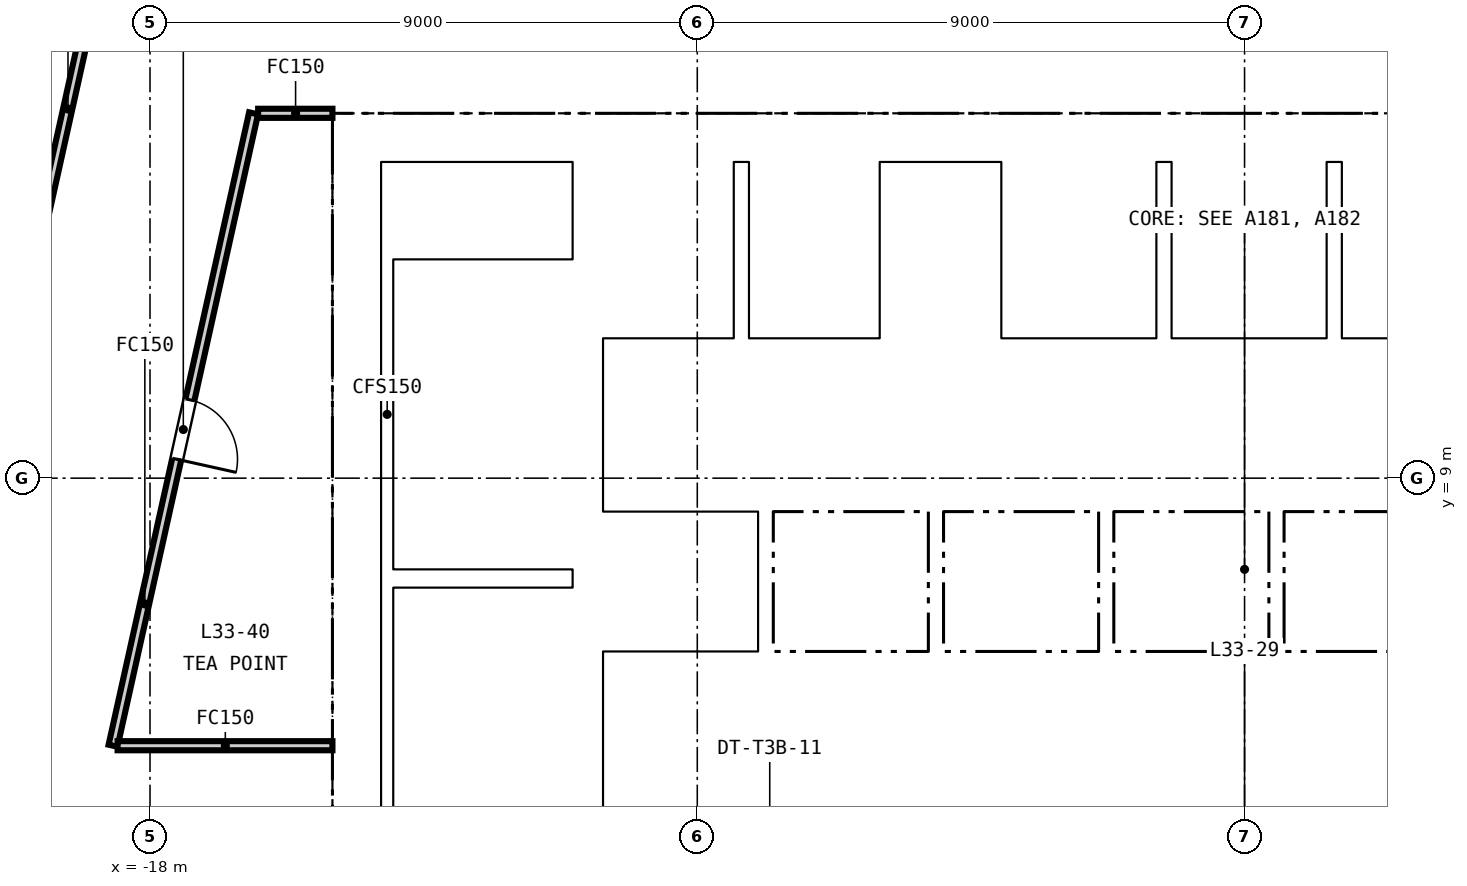
"""IFC4 building model, lengths in metres.
Left out: names, types, materials, properties, quantities, classifications, styles, units other than length and angle.
Written with IfcOpenShell. Run it as: python <this file> out.ifc"""

import sys

from ifc_helpers import new_model, si_unit, direction, frame, frame_2d, origin, place, context, subcontext, project, spatial, rectangle, extrude, element, fill, save


model = new_model("IFC4")
c1 = context("Model", 3, precision=1e-05, world=origin(), true_north=direction((0.0, 1.0)))
c2 = subcontext(c1, "Body", "Model", "MODEL_VIEW")
j1 = project(units=[si_unit("LENGTHUNIT", "METRE"), si_unit("PLANEANGLEUNIT", "RADIAN")], contexts=[c1])
p1 = place(None, origin())
s1 = spatial("IfcSite", under=j1, at=p1, CompositionType="ELEMENT")
p2 = place(p1, origin())
s2 = spatial("IfcBuilding", under=s1, at=p2, CompositionType="ELEMENT")
p3 = place(p2, frame((0.0, 0.0, 137.1)))
s3 = spatial("IfcBuildingStorey", under=s2, at=p3, CompositionType="ELEMENT", Elevation=137.1)
p4 = place(p3, frame((-15.0, 14.6, -0.15), z_axis=(0.0, 0.0, 1.0), x_axis=(1.0, 0.0, 0.0)))
e1 = element("IfcWall", 1, at=p4, inside=s3, PredefinedType="SOLIDWALL", context=c2, shape_type="SweptSolid", body=[
    extrude(rectangle(XDim=30.0, YDim=0.8, at=frame_2d((15.0, 0.0))), origin(), (0.0, 0.0, 1.0), 3.65),
])
p5 = place(p4, frame((9.25, 0.0, 0.15)))
e2 = element("IfcOpeningElement", 2, at=p5, cuts=e1, PredefinedType="OPENING", context=c2, shape_type="SweptSolid", body=[
    extrude(rectangle(XDim=1.5, YDim=2.1, at=frame_2d((0.75, 1.05))), frame((0.0, 0.41, 0.0), z_axis=(0.0, -1.0, 0.0), x_axis=(1.0, 0.0, 0.0)), (0.0, 0.0, 1.0), 0.82),
])
p6 = place(p4, frame((19.4, 0.0, 0.15)))
e3 = element("IfcOpeningElement", 3, at=p6, cuts=e1, PredefinedType="OPENING", context=c2, shape_type="SweptSolid", body=[
    extrude(rectangle(XDim=1.5, YDim=2.1, at=frame_2d((0.75, 1.05))), frame((0.0, 0.41, 0.0), z_axis=(0.0, -1.0, 0.0), x_axis=(1.0, 0.0, 0.0)), (0.0, 0.0, 1.0), 0.82),
])
p7 = place(p4, frame((1.5, 0.0, 0.15)))
e4 = element("IfcOpeningElement", 4, at=p7, cuts=e1, PredefinedType="OPENING", context=c2, shape_type="SweptSolid", body=[
    extrude(rectangle(XDim=1.2, YDim=2.1, at=frame_2d((0.6, 1.05))), frame((0.0, 0.41, 0.0), z_axis=(0.0, -1.0, 0.0), x_axis=(1.0, 0.0, 0.0)), (0.0, 0.0, 1.0), 0.82),
])
p8 = place(p4, frame((27.3, 0.0, 0.15)))
e5 = element("IfcOpeningElement", 5, at=p8, cuts=e1, PredefinedType="OPENING", context=c2, shape_type="SweptSolid", body=[
    extrude(rectangle(XDim=1.2, YDim=2.1, at=frame_2d((0.6, 1.05))), frame((0.0, 0.41, 0.0), z_axis=(0.0, -1.0, 0.0), x_axis=(1.0, 0.0, 0.0)), (0.0, 0.0, 1.0), 0.82),
])
p9 = place(p3, frame((-14.6, 0.8, -0.15), z_axis=(0.0, 0.0, 1.0), x_axis=(0.0, 1.0, 0.0)))
e6 = element("IfcWall", 6, at=p9, inside=s3, PredefinedType="SOLIDWALL", context=c2, shape_type="SweptSolid", body=[
    extrude(rectangle(XDim=13.4, YDim=0.8, at=frame_2d((6.7, 0.0))), origin(), (0.0, 0.0, 1.0), 3.65),
])
p10 = place(p3, frame((-10.8, 0.8, -0.15), z_axis=(0.0, 0.0, 1.0), x_axis=(0.0, 1.0, 0.0)))
e7 = element("IfcWall", 7, at=p10, inside=s3, PredefinedType="SOLIDWALL", context=c2, shape_type="SweptSolid", body=[
    extrude(rectangle(XDim=13.4, YDim=0.5, at=frame_2d((6.7, 0.0))), origin(), (0.0, 0.0, 1.0), 3.65),
])
p11 = place(p3, frame((-10.55, 6.025, 0.0), z_axis=(0.0, 0.0, 1.0), x_axis=(1.0, 0.0, 0.0)))
e8 = element("IfcWall", 8, at=p11, inside=s3, PredefinedType="PARTITIONING", context=c2, shape_type="SweptSolid", body=[
    extrude(rectangle(XDim=21.1, YDim=0.25, at=frame_2d((10.55, 0.0))), origin(), (0.0, 0.0, 1.0), 3.5),
])
p12 = place(p3, frame((-10.55, 8.55, 0.0), z_axis=(0.0, 0.0, 1.0), x_axis=(1.0, 0.0, 0.0)))
e9 = element("IfcWall", 9, at=p12, inside=s3, PredefinedType="PARTITIONING", context=c2, shape_type="SweptSolid", body=[
    extrude(rectangle(XDim=21.1, YDim=0.2, at=frame_2d((10.55, 0.0))), origin(), (0.0, 0.0, 1.0), 3.5),
])
p13 = place(p12, frame((0.675, 0.0, 0.0)))
e10 = element("IfcOpeningElement", 10, at=p13, cuts=e9, PredefinedType="OPENING", context=c2, shape_type="SweptSolid", body=[
    extrude(rectangle(XDim=1.2, YDim=2.1, at=frame_2d((0.6, 1.05))), frame((0.0, 0.11, 0.0), z_axis=(0.0, -1.0, 0.0), x_axis=(1.0, 0.0, 0.0)), (0.0, 0.0, 1.0), 0.22),
])
p14 = place(p12, frame((3.475, 0.0, 0.0)))
e11 = element("IfcOpeningElement", 11, at=p14, cuts=e9, PredefinedType="OPENING", context=c2, shape_type="SweptSolid", body=[
    extrude(rectangle(XDim=1.2, YDim=2.1, at=frame_2d((0.6, 1.05))), frame((0.0, 0.11, 0.0), z_axis=(0.0, -1.0, 0.0), x_axis=(1.0, 0.0, 0.0)), (0.0, 0.0, 1.0), 0.22),
])
p15 = place(p12, frame((6.275, 0.0, 0.0)))
e12 = element("IfcOpeningElement", 12, at=p15, cuts=e9, PredefinedType="OPENING", context=c2, shape_type="SweptSolid", body=[
    extrude(rectangle(XDim=1.2, YDim=2.1, at=frame_2d((0.6, 1.05))), frame((0.0, 0.11, 0.0), z_axis=(0.0, -1.0, 0.0), x_axis=(1.0, 0.0, 0.0)), (0.0, 0.0, 1.0), 0.22),
])
p16 = place(p12, frame((9.075, 0.0, 0.0)))
e13 = element("IfcOpeningElement", 13, at=p16, cuts=e9, PredefinedType="OPENING", context=c2, shape_type="SweptSolid", body=[
    extrude(rectangle(XDim=1.2, YDim=2.1, at=frame_2d((0.6, 1.05))), frame((0.0, 0.11, 0.0), z_axis=(0.0, -1.0, 0.0), x_axis=(1.0, 0.0, 0.0)), (0.0, 0.0, 1.0), 0.22),
])
p17 = place(p12, frame((11.875, 0.0, 0.0)))
e14 = element("IfcOpeningElement", 14, at=p17, cuts=e9, PredefinedType="OPENING", context=c2, shape_type="SweptSolid", body=[
    extrude(rectangle(XDim=1.2, YDim=2.1, at=frame_2d((0.6, 1.05))), frame((0.0, 0.11, 0.0), z_axis=(0.0, -1.0, 0.0), x_axis=(1.0, 0.0, 0.0)), (0.0, 0.0, 1.0), 0.22),
])
p18 = place(p12, frame((14.675, 0.0, 0.0)))
e15 = element("IfcOpeningElement", 15, at=p18, cuts=e9, PredefinedType="OPENING", context=c2, shape_type="SweptSolid", body=[
    extrude(rectangle(XDim=1.2, YDim=2.1, at=frame_2d((0.6, 1.05))), frame((0.0, 0.11, 0.0), z_axis=(0.0, -1.0, 0.0), x_axis=(1.0, 0.0, 0.0)), (0.0, 0.0, 1.0), 0.22),
])
p19 = place(p12, frame((17.475, 0.0, 0.0)))
e16 = element("IfcOpeningElement", 16, at=p19, cuts=e9, PredefinedType="OPENING", context=c2, shape_type="SweptSolid", body=[
    extrude(rectangle(XDim=1.2, YDim=2.1, at=frame_2d((0.6, 1.05))), frame((0.0, 0.11, 0.0), z_axis=(0.0, -1.0, 0.0), x_axis=(1.0, 0.0, 0.0)), (0.0, 0.0, 1.0), 0.22),
])
p20 = place(p12, frame((19.9, 0.0, 0.0)))
e17 = element("IfcOpeningElement", 17, at=p20, cuts=e9, PredefinedType="OPENING", context=c2, shape_type="SweptSolid", body=[
    extrude(rectangle(XDim=0.9, YDim=2.1, at=frame_2d((0.45, 1.05))), frame((0.0, 0.11, 0.0), z_axis=(0.0, -1.0, 0.0), x_axis=(1.0, 0.0, 0.0)), (0.0, 0.0, 1.0), 0.22),
])
p21 = place(p3, frame((-10.55, 11.2, 0.0), z_axis=(0.0, 0.0, 1.0), x_axis=(1.0, 0.0, 0.0)))
e18 = element("IfcWall", 18, at=p21, inside=s3, PredefinedType="PARTITIONING", context=c2, shape_type="SweptSolid", body=[
    extrude(rectangle(XDim=4.8, YDim=0.2, at=frame_2d((2.4, 0.0))), origin(), (0.0, 0.0, 1.0), 3.5),
])
p22 = place(p21, frame((0.525, 0.0, 0.0)))
e19 = element("IfcOpeningElement", 19, at=p22, cuts=e18, PredefinedType="OPENING", context=c2, shape_type="SweptSolid", body=[
    extrude(rectangle(XDim=1.1, YDim=2.1, at=frame_2d((0.55, 1.05))), frame((0.0, 0.11, 0.0), z_axis=(0.0, -1.0, 0.0), x_axis=(1.0, 0.0, 0.0)), (0.0, 0.0, 1.0), 0.22),
])
p23 = place(p21, frame((2.925, 0.0, 0.0)))
e20 = element("IfcOpeningElement", 20, at=p23, cuts=e18, PredefinedType="OPENING", context=c2, shape_type="SweptSolid", body=[
    extrude(rectangle(XDim=1.1, YDim=2.1, at=frame_2d((0.55, 1.05))), frame((0.0, 0.11, 0.0), z_axis=(0.0, -1.0, 0.0), x_axis=(1.0, 0.0, 0.0)), (0.0, 0.0, 1.0), 0.22),
])
p24 = place(p3, frame((-4.25, 11.2, 0.0), z_axis=(0.0, 0.0, 1.0), x_axis=(1.0, 0.0, 0.0)))
e21 = element("IfcWall", 21, at=p24, inside=s3, PredefinedType="PARTITIONING", context=c2, shape_type="SweptSolid", body=[
    extrude(rectangle(XDim=8.65, YDim=0.2, at=frame_2d((4.325, 0.0))), origin(), (0.0, 0.0, 1.0), 3.5),
])
p25 = place(p24, frame((0.825, 0.0, 0.0)))
e22 = element("IfcOpeningElement", 22, at=p25, cuts=e21, PredefinedType="OPENING", context=c2, shape_type="SweptSolid", body=[
    extrude(rectangle(XDim=1.4, YDim=2.1, at=frame_2d((0.7, 1.05))), frame((0.0, 0.11, 0.0), z_axis=(0.0, -1.0, 0.0), x_axis=(1.0, 0.0, 0.0)), (0.0, 0.0, 1.0), 0.22),
])
p26 = place(p24, frame((3.625, 0.0, 0.0)))
e23 = element("IfcOpeningElement", 23, at=p26, cuts=e21, PredefinedType="OPENING", context=c2, shape_type="SweptSolid", body=[
    extrude(rectangle(XDim=1.4, YDim=2.1, at=frame_2d((0.7, 1.05))), frame((0.0, 0.11, 0.0), z_axis=(0.0, -1.0, 0.0), x_axis=(1.0, 0.0, 0.0)), (0.0, 0.0, 1.0), 0.22),
])
p27 = place(p3, frame((-4.125, 8.65, 0.0), z_axis=(0.0, 0.0, 1.0), x_axis=(0.0, 1.0, 0.0)))
e24 = element("IfcWall", 24, at=p27, inside=s3, PredefinedType="PARTITIONING", context=c2, shape_type="SweptSolid", body=[
    extrude(rectangle(XDim=2.45, YDim=0.25, at=frame_2d((1.225, 0.0))), origin(), (0.0, 0.0, 1.0), 3.5),
])
p28 = place(p27, frame((0.625, 0.0, 0.0)))
e25 = element("IfcOpeningElement", 25, at=p28, cuts=e24, PredefinedType="OPENING", context=c2, shape_type="SweptSolid", body=[
    extrude(rectangle(XDim=1.2, YDim=2.1, at=frame_2d((0.6, 1.05))), frame((0.0, 0.135, 0.0), z_axis=(0.0, -1.0, 0.0), x_axis=(1.0, 0.0, 0.0)), (0.0, 0.0, 1.0), 0.27),
])
for number, where, z_axis, x_axis in (
    (26, (-8.15, 3.6, 0.0), (0.0, 0.0, 1.0), (0.0, 1.0, 0.0)),
    (27, (-3.35, 3.6, 0.0), (0.0, 0.0, 1.0), (0.0, 1.0, 0.0)),
    (28, (1.45, 3.6, 0.0), (0.0, 0.0, 1.0), (0.0, 1.0, 0.0)),
):
    element("IfcWall", number, at=place(p3, frame(where, z_axis=z_axis, x_axis=x_axis)), inside=s3, PredefinedType="PARTITIONING", context=c2, shape_type="SweptSolid", body=[
        extrude(rectangle(XDim=2.3, YDim=0.15, at=frame_2d((1.15, 0.0))), origin(), (0.0, 0.0, 1.0), 3.5),
    ])
for number, where, z_axis, x_axis in (
    (29, (-7.875, 6.15, 0.0), (0.0, 0.0, 1.0), (0.0, 1.0, 0.0)),
    (30, (-5.075, 6.15, 0.0), (0.0, 0.0, 1.0), (0.0, 1.0, 0.0)),
    (31, (-2.275, 6.15, 0.0), (0.0, 0.0, 1.0), (0.0, 1.0, 0.0)),
    (32, (0.525, 6.15, 0.0), (0.0, 0.0, 1.0), (0.0, 1.0, 0.0)),
):
    element("IfcWall", number, at=place(p3, frame(where, z_axis=z_axis, x_axis=x_axis)), inside=s3, PredefinedType="PARTITIONING", context=c2, shape_type="SweptSolid", body=[
        extrude(rectangle(XDim=2.3, YDim=0.25, at=frame_2d((1.15, 0.0))), origin(), (0.0, 0.0, 1.0), 3.5),
    ])
for number, where, z_axis, x_axis in (
    (33, (-8.275, 11.3, 0.0), (0.0, 0.0, 1.0), (0.0, 1.0, 0.0)),
    (34, (-5.875, 11.3, 0.0), (0.0, 0.0, 1.0), (0.0, 1.0, 0.0)),
    (35, (-4.125, 11.3, 0.0), (0.0, 0.0, 1.0), (0.0, 1.0, 0.0)),
    (36, (-1.325, 11.3, 0.0), (0.0, 0.0, 1.0), (0.0, 1.0, 0.0)),
    (37, (1.475, 11.3, 0.0), (0.0, 0.0, 1.0), (0.0, 1.0, 0.0)),
):
    element("IfcWall", number, at=place(p3, frame(where, z_axis=z_axis, x_axis=x_axis)), inside=s3, PredefinedType="PARTITIONING", context=c2, shape_type="SweptSolid", body=[
        extrude(rectangle(XDim=2.9, YDim=0.25, at=frame_2d((1.45, 0.0))), origin(), (0.0, 0.0, 1.0), 3.5),
    ])
p29 = place(p3, frame((-14.0, 7.35, 0.0), z_axis=(0.0, 0.0, 1.0), x_axis=(1.0, 0.0, 0.0)))
e38 = element("IfcWall", 38, at=p29, inside=s3, PredefinedType="SOLIDWALL", context=c2, shape_type="SweptSolid", body=[
    extrude(rectangle(XDim=2.95, YDim=0.3, at=frame_2d((1.475, 0.0))), origin(), (0.0, 0.0, 1.0), 3.5),
])
p30 = place(p3, frame((-14.1, 0.8, 0.0), z_axis=(0.0, 0.0, 1.0), x_axis=(0.0, 1.0, 0.0)))
e39 = element("IfcWall", 39, at=p30, inside=s3, PredefinedType="SOLIDWALL", context=c2, shape_type="SweptSolid", body=[
    extrude(rectangle(XDim=13.4, YDim=0.2, at=frame_2d((6.7, 0.0))), origin(), (0.0, 0.0, 1.0), 3.5),
])
p31 = place(p3, frame((-16.297, 15.0, 0.0), z_axis=(0.0, 0.0, 1.0), x_axis=(-0.216903766867, -0.976192991124, 0.0)))
e40 = element("IfcWall", 40, at=p31, inside=s3, PredefinedType="PARTITIONING", context=c2, shape_type="SweptSolid", body=[
    extrude(rectangle(XDim=10.654, YDim=0.15, at=frame_2d((5.327, 0.0))), origin(), (0.0, 0.0, 1.0), 2.741),
])
p32 = place(p31, frame((4.827, 0.0, 0.0)))
e41 = element("IfcOpeningElement", 41, at=p32, cuts=e40, PredefinedType="OPENING", context=c2, shape_type="SweptSolid", body=[
    extrude(rectangle(XDim=1.0, YDim=2.1, at=frame_2d((0.5, 1.05))), frame((0.0, 0.085, 0.0), z_axis=(0.0, -1.0, 0.0), x_axis=(1.0, 0.0, 0.0)), (0.0, 0.0, 1.0), 0.17),
])
p33 = place(p3, frame((-15.0, 15.0, 0.0), z_axis=(0.0, 0.0, 1.0), x_axis=(-1.0, 0.0, 0.0)))
e42 = element("IfcWall", 42, at=p33, inside=s3, PredefinedType="PARTITIONING", context=c2, shape_type="SweptSolid", body=[
    extrude(rectangle(XDim=1.222, YDim=0.15, at=frame_2d((0.611, 0.0))), origin(), (0.0, 0.0, 1.0), 2.741),
])
p34 = place(p3, frame((-20.005, 12.141, 0.0), z_axis=(0.0, 0.0, 1.0), x_axis=(0.216934764879, 0.976186103049, 0.0)))
e43 = element("IfcWall", 43, at=p34, inside=s3, PredefinedType="PARTITIONING", context=c2, shape_type="SweptSolid", body=[
    extrude(rectangle(XDim=6.002, YDim=0.15, at=frame_2d((3.001, 0.0))), origin(), (0.0, 0.0, 1.0), 2.741),
])
p35 = place(p3, frame((-18.533, 4.6, 0.0), z_axis=(0.0, 0.0, 1.0), x_axis=(1.0, 0.0, 0.0)))
e44 = element("IfcWall", 44, at=p35, inside=s3, PredefinedType="PARTITIONING", context=c2, shape_type="SweptSolid", body=[
    extrude(rectangle(XDim=3.533, YDim=0.15, at=frame_2d((1.767, 0.0))), origin(), (0.0, 0.0, 1.0), 2.741),
])
p36 = place(p28, origin())
e45 = element("IfcDoor", 45, at=p36, inside=s3, OperationType="SINGLE_SWING_LEFT", PredefinedType="DOOR", context=c2, shape_type="SweptSolid", body=[
    extrude(rectangle(XDim=1.2, YDim=2.1, at=frame_2d((0.6, 1.05))), frame((0.0, 0.025, 0.0), z_axis=(0.0, -1.0, 0.0), x_axis=(1.0, 0.0, 0.0)), (0.0, 0.0, 1.0), 0.05),
])
fill(e25, e45)
p37 = place(p13, origin())
e46 = element("IfcDoor", 46, at=p37, inside=s3, OperationType="DOUBLE_DOOR_SLIDING", PredefinedType="DOOR", context=c2, shape_type="SweptSolid", body=[
    extrude(rectangle(XDim=1.2, YDim=2.1, at=frame_2d((0.6, 1.05))), frame((0.0, 0.025, 0.0), z_axis=(0.0, -1.0, 0.0), x_axis=(1.0, 0.0, 0.0)), (0.0, 0.0, 1.0), 0.05),
])
fill(e10, e46)
p38 = place(p14, origin())
e47 = element("IfcDoor", 47, at=p38, inside=s3, OperationType="DOUBLE_DOOR_SLIDING", PredefinedType="DOOR", context=c2, shape_type="SweptSolid", body=[
    extrude(rectangle(XDim=1.2, YDim=2.1, at=frame_2d((0.6, 1.05))), frame((0.0, 0.025, 0.0), z_axis=(0.0, -1.0, 0.0), x_axis=(1.0, 0.0, 0.0)), (0.0, 0.0, 1.0), 0.05),
])
fill(e11, e47)
p39 = place(p15, origin())
e48 = element("IfcDoor", 48, at=p39, inside=s3, OperationType="DOUBLE_DOOR_SLIDING", PredefinedType="DOOR", context=c2, shape_type="SweptSolid", body=[
    extrude(rectangle(XDim=1.2, YDim=2.1, at=frame_2d((0.6, 1.05))), frame((0.0, 0.025, 0.0), z_axis=(0.0, -1.0, 0.0), x_axis=(1.0, 0.0, 0.0)), (0.0, 0.0, 1.0), 0.05),
])
fill(e12, e48)
p40 = place(p16, origin())
e49 = element("IfcDoor", 49, at=p40, inside=s3, OperationType="DOUBLE_DOOR_SLIDING", PredefinedType="DOOR", context=c2, shape_type="SweptSolid", body=[
    extrude(rectangle(XDim=1.2, YDim=2.1, at=frame_2d((0.6, 1.05))), frame((0.0, 0.025, 0.0), z_axis=(0.0, -1.0, 0.0), x_axis=(1.0, 0.0, 0.0)), (0.0, 0.0, 1.0), 0.05),
])
fill(e13, e49)
p41 = place(p17, origin())
e50 = element("IfcDoor", 50, at=p41, inside=s3, OperationType="DOUBLE_DOOR_SLIDING", PredefinedType="DOOR", context=c2, shape_type="SweptSolid", body=[
    extrude(rectangle(XDim=1.2, YDim=2.1, at=frame_2d((0.6, 1.05))), frame((0.0, 0.025, 0.0), z_axis=(0.0, -1.0, 0.0), x_axis=(1.0, 0.0, 0.0)), (0.0, 0.0, 1.0), 0.05),
])
fill(e14, e50)
p42 = place(p22, origin())
e51 = element("IfcDoor", 51, at=p42, inside=s3, OperationType="DOUBLE_DOOR_SLIDING", PredefinedType="DOOR", context=c2, shape_type="SweptSolid", body=[
    extrude(rectangle(XDim=1.1, YDim=2.1, at=frame_2d((0.55, 1.05))), frame((0.0, 0.025, 0.0), z_axis=(0.0, -1.0, 0.0), x_axis=(1.0, 0.0, 0.0)), (0.0, 0.0, 1.0), 0.05),
])
fill(e19, e51)
p43 = place(p23, origin())
e52 = element("IfcDoor", 52, at=p43, inside=s3, OperationType="DOUBLE_DOOR_SLIDING", PredefinedType="DOOR", context=c2, shape_type="SweptSolid", body=[
    extrude(rectangle(XDim=1.1, YDim=2.1, at=frame_2d((0.55, 1.05))), frame((0.0, 0.025, 0.0), z_axis=(0.0, -1.0, 0.0), x_axis=(1.0, 0.0, 0.0)), (0.0, 0.0, 1.0), 0.05),
])
fill(e20, e52)
p44 = place(p25, origin())
e53 = element("IfcDoor", 53, at=p44, inside=s3, OperationType="DOUBLE_DOOR_SLIDING", PredefinedType="DOOR", context=c2, shape_type="SweptSolid", body=[
    extrude(rectangle(XDim=1.4, YDim=2.1, at=frame_2d((0.7, 1.05))), frame((0.0, 0.025, 0.0), z_axis=(0.0, -1.0, 0.0), x_axis=(1.0, 0.0, 0.0)), (0.0, 0.0, 1.0), 0.05),
])
fill(e22, e53)
p45 = place(p26, origin())
e54 = element("IfcDoor", 54, at=p45, inside=s3, OperationType="DOUBLE_DOOR_SLIDING", PredefinedType="DOOR", context=c2, shape_type="SweptSolid", body=[
    extrude(rectangle(XDim=1.4, YDim=2.1, at=frame_2d((0.7, 1.05))), frame((0.0, 0.025, 0.0), z_axis=(0.0, -1.0, 0.0), x_axis=(1.0, 0.0, 0.0)), (0.0, 0.0, 1.0), 0.05),
])
fill(e23, e54)
p46 = place(p5, origin())
e55 = element("IfcDoor", 55, at=p46, inside=s3, OperationType="DOUBLE_DOOR_SINGLE_SWING", PredefinedType="DOOR", context=c2, shape_type="SweptSolid", body=[
    extrude(rectangle(XDim=1.5, YDim=2.1, at=frame_2d((0.75, 1.05))), frame((0.0, 0.025, 0.0), z_axis=(0.0, -1.0, 0.0), x_axis=(1.0, 0.0, 0.0)), (0.0, 0.0, 1.0), 0.05),
])
fill(e2, e55)
p47 = place(p7, origin())
e56 = element("IfcDoor", 56, at=p47, inside=s3, OperationType="SINGLE_SWING_RIGHT", PredefinedType="DOOR", context=c2, shape_type="SweptSolid", body=[
    extrude(rectangle(XDim=1.2, YDim=2.1, at=frame_2d((0.6, 1.05))), frame((0.0, 0.025, 0.0), z_axis=(0.0, -1.0, 0.0), x_axis=(1.0, 0.0, 0.0)), (0.0, 0.0, 1.0), 0.05),
])
fill(e4, e56)
p48 = place(p32, origin())
e57 = element("IfcDoor", 57, at=p48, inside=s3, OperationType="SINGLE_SWING_RIGHT", PredefinedType="DOOR", context=c2, shape_type="SweptSolid", body=[
    extrude(rectangle(XDim=1.0, YDim=2.1, at=frame_2d((0.5, 1.05))), frame((0.0, 0.025, 0.0), z_axis=(0.0, -1.0, 0.0), x_axis=(1.0, 0.0, 0.0)), (0.0, 0.0, 1.0), 0.05),
])
fill(e41, e57)
save(model, sys.argv[1])
